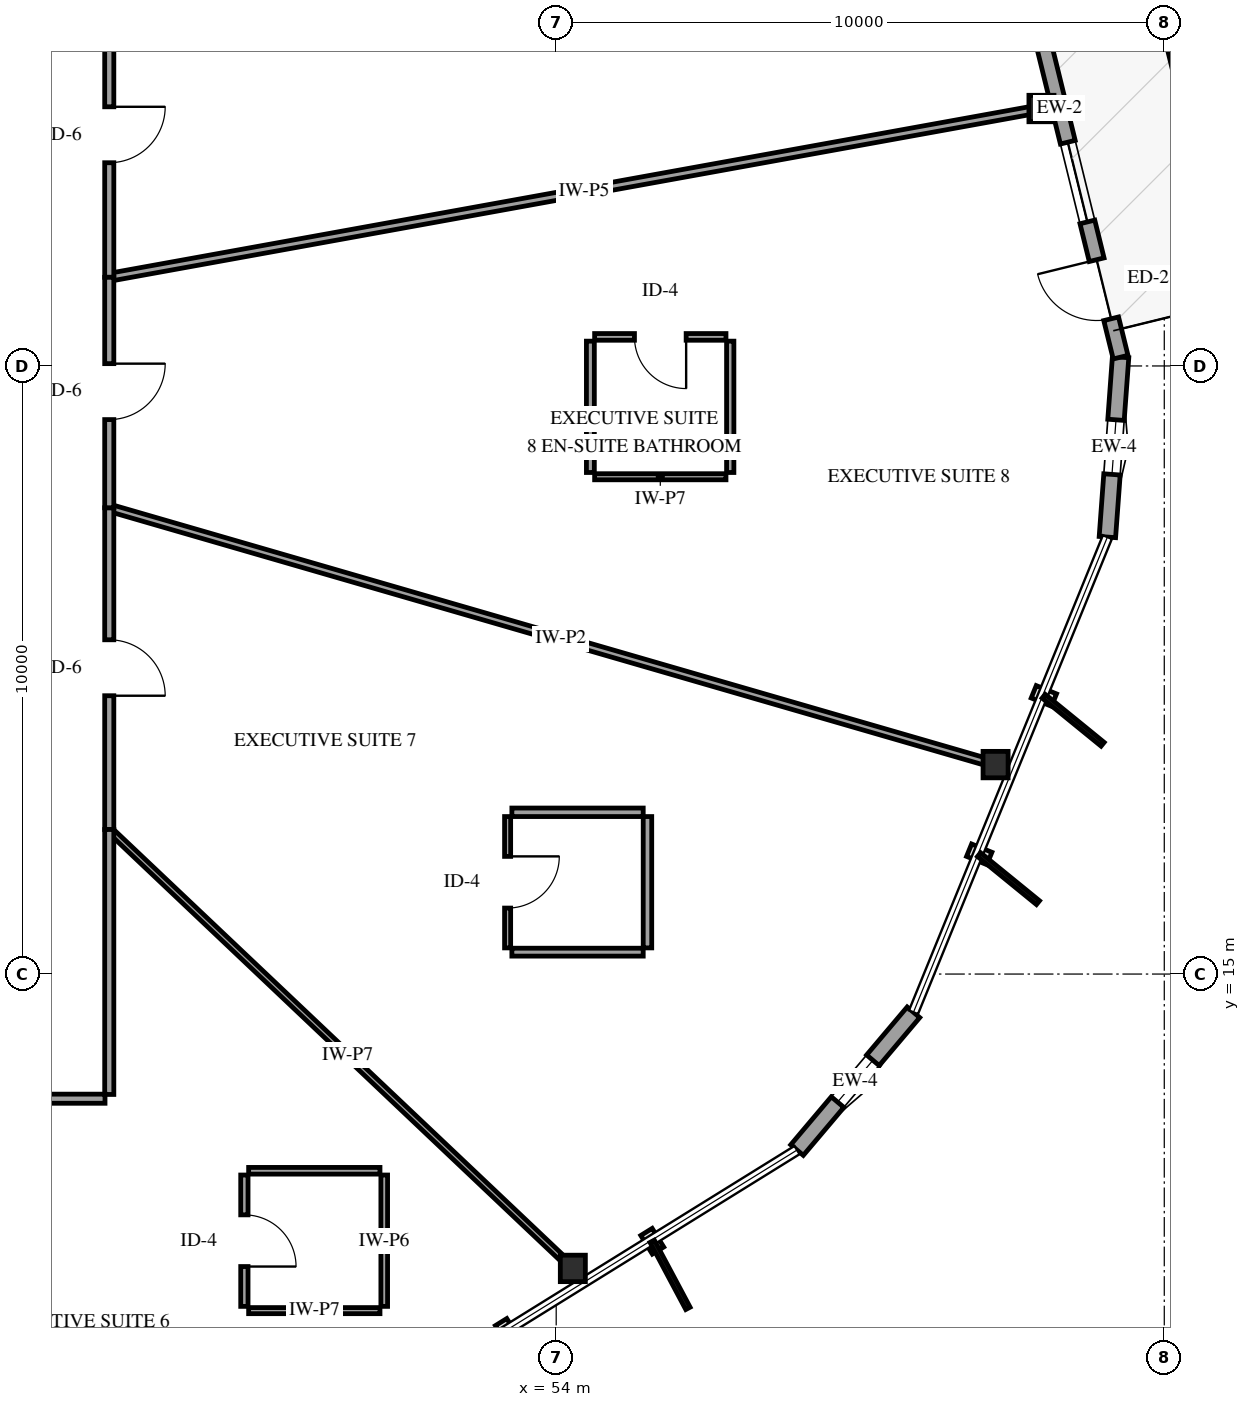
"""IFC4 building model, lengths in metres.
Left out: names, types, materials, properties, quantities, classifications, styles, units other than length and angle.
Written with IfcOpenShell. Run it as: python <this file> out.ifc"""

import sys

from ifc_helpers import new_model, si_unit, direction, frame, frame_2d, origin, origin_2d, place, context, subcontext, project, spatial, rectangle, i_section, extrude, element, fill, save


model = new_model("IFC4")
c1 = context("Model", 3, precision=1e-05, world=origin(), true_north=direction((0.0, 1.0)))
c2 = subcontext(c1, "Body", "Model", "MODEL_VIEW")
j1 = project(units=[si_unit("LENGTHUNIT", "METRE"), si_unit("PLANEANGLEUNIT", "RADIAN")], contexts=[c1])
p1 = place(None, origin())
s1 = spatial("IfcSite", under=j1, at=p1, CompositionType="ELEMENT")
p2 = place(p1, origin())
s2 = spatial("IfcBuilding", under=s1, at=p2, CompositionType="ELEMENT")
p3 = place(p2, frame((0.0, 0.0, 153.4)))
s3 = spatial("IfcBuildingStorey", under=s2, at=p3, CompositionType="ELEMENT", Elevation=153.4)
for number, where, z_axis, x_axis in (
    (1, (61.98, 29.234, 0.0), (0.0, 0.0, 1.0), (1.0, 0.0, 0.0)),
    (2, (54.274, 10.159, 0.0), (0.0, 0.0, 1.0), (1.0, 0.0, 0.0)),
    (3, (61.226, 18.444, 0.0), (0.0, 0.0, 1.0), (1.0, 0.0, 0.0)),
):
    element("IfcColumn", number, at=place(p3, frame(where, z_axis=z_axis, x_axis=x_axis)), inside=s3, PredefinedType="COLUMN", context=c2, shape_type="SweptSolid", body=[
        extrude(i_section(OverallWidth=0.412, OverallDepth=0.435, WebThickness=0.036, FlangeThickness=0.057, FilletRadius=0.038, at=origin_2d()), origin(), (0.0, 0.0, 1.0), 3.6),
    ])
p4 = place(p3, frame((57.96, 12.106, 0.0), z_axis=(0.0, 0.0, 1.0), x_axis=(0.645495712839, 0.763763893299, 0.0)))
e4 = element("IfcWall", 4, at=p4, inside=s3, PredefinedType="SOLIDWALL", context=c2, shape_type="SweptSolid", body=[
    extrude(rectangle(XDim=2.966, YDim=0.27, at=frame_2d((1.483, 0.0))), origin(), (0.0, 0.0, 1.0), 2.679),
])
p5 = place(p4, frame((1.033, 0.0, 0.75)))
e5 = element("IfcOpeningElement", 5, at=p5, cuts=e4, PredefinedType="OPENING", context=c2, shape_type="SweptSolid", body=[
    extrude(rectangle(XDim=0.9, YDim=1.5, at=frame_2d((0.45, 0.75))), frame((0.0, 0.145, 0.0), z_axis=(0.0, -1.0, 0.0), x_axis=(1.0, 0.0, 0.0)), (0.0, 0.0, 1.0), 0.29),
])
p6 = place(p3, frame((63.064, 22.186, 0.0), z_axis=(0.0, 0.0, 1.0), x_axis=(0.073247177567, 0.997313817702, 0.0)))
e6 = element("IfcWall", 6, at=p6, inside=s3, PredefinedType="SOLIDWALL", context=c2, shape_type="SweptSolid", body=[
    extrude(rectangle(XDim=2.967, YDim=0.27, at=frame_2d((1.483, 0.0))), origin(), (0.0, 0.0, 1.0), 2.679),
])
p7 = place(p6, frame((1.033, 0.0, 0.75)))
e7 = element("IfcOpeningElement", 7, at=p7, cuts=e6, PredefinedType="OPENING", context=c2, shape_type="SweptSolid", body=[
    extrude(rectangle(XDim=0.9, YDim=1.5, at=frame_2d((0.45, 0.75))), frame((0.0, 0.145, 0.0), z_axis=(0.0, -1.0, 0.0), x_axis=(1.0, 0.0, 0.0)), (0.0, 0.0, 1.0), 0.29),
])
p8 = place(p3, frame((63.282, 25.145, 0.0), z_axis=(0.0, 0.0, 1.0), x_axis=(-0.238545314463, 0.971131367503, 0.0)))
e8 = element("IfcWall", 8, at=p8, inside=s3, PredefinedType="SOLIDWALL", context=c2, shape_type="SweptSolid", body=[
    extrude(rectangle(XDim=8.44, YDim=0.25, at=frame_2d((4.22, 0.0))), origin(), (0.0, 0.0, 1.0), 2.679),
])
p9 = place(p8, frame((0.65, 0.0, 0.0)))
e9 = element("IfcOpeningElement", 9, at=p9, cuts=e8, PredefinedType="OPENING", context=c2, shape_type="SweptSolid", body=[
    extrude(rectangle(XDim=1.0, YDim=2.15, at=frame_2d((0.5, 1.075))), frame((0.0, 0.135, 0.0), z_axis=(0.0, -1.0, 0.0), x_axis=(1.0, 0.0, 0.0)), (0.0, 0.0, 1.0), 0.27),
])
p10 = place(p8, frame((2.29, 0.0, 0.72)))
e10 = element("IfcOpeningElement", 10, at=p10, cuts=e8, PredefinedType="OPENING", context=c2, shape_type="SweptSolid", body=[
    extrude(rectangle(XDim=1.35, YDim=1.65, at=frame_2d((0.675, 0.825))), frame((0.0, 0.135, 0.0), z_axis=(0.0, -1.0, 0.0), x_axis=(1.0, 0.0, 0.0)), (0.0, 0.0, 1.0), 0.27),
])
p11 = place(p3, frame((62.265, 29.285, 0.0), z_axis=(0.0, 0.0, 1.0), x_axis=(-0.984004770571, -0.17814211039, 0.0)))
e11 = element("IfcWall", 11, at=p11, inside=s3, PredefinedType="PARTITIONING", context=c2, shape_type="SweptSolid", body=[
    extrude(rectangle(XDim=15.869, YDim=0.13, at=frame_2d((7.935, 0.0))), origin(), (0.0, 0.0, 1.0), 2.595),
])
p12 = place(p3, frame((46.65, 22.668, 0.0), z_axis=(0.0, 0.0, 1.0), x_axis=(0.960493218243, -0.27830339148, 0.0)))
e12 = element("IfcWall", 12, at=p12, inside=s3, PredefinedType="PARTITIONING", context=c2, shape_type="SweptSolid", body=[
    extrude(rectangle(XDim=15.465, YDim=0.12, at=frame_2d((7.732, 0.0))), origin(), (0.0, 0.0, 1.0), 3.3),
])
p13 = place(p3, frame((46.65, 17.377, 0.0), z_axis=(0.0, 0.0, 1.0), x_axis=(0.726165374711, -0.687520071395, 0.0)))
e13 = element("IfcWall", 13, at=p13, inside=s3, PredefinedType="PARTITIONING", context=c2, shape_type="SweptSolid", body=[
    extrude(rectangle(XDim=10.797, YDim=0.1, at=frame_2d((5.398, 0.0))), origin(), (0.0, 0.0, 1.0), 2.595),
])
p14 = place(p3, frame((46.65, 22.668, 0.0), z_axis=(0.0, 0.0, 1.0), x_axis=(0.0, -1.0, 0.0)))
e14 = element("IfcWall", 14, at=p14, inside=s3, PredefinedType="PARTITIONING", context=c2, shape_type="SweptSolid", body=[
    extrude(rectangle(XDim=5.291, YDim=0.15, at=frame_2d((2.646, 0.0))), origin(), (0.0, 0.0, 1.0), 3.3),
])
p15 = place(p14, frame((2.171, 0.0, 0.0)))
e15 = element("IfcOpeningElement", 15, at=p15, cuts=e14, PredefinedType="OPENING", context=c2, shape_type="SweptSolid", body=[
    extrude(rectangle(XDim=0.92, YDim=2.12, at=frame_2d((0.46, 1.06))), frame((0.0, 0.085, 0.0), z_axis=(0.0, -1.0, 0.0), x_axis=(1.0, 0.0, 0.0)), (0.0, 0.0, 1.0), 0.17),
])
p16 = place(p3, frame((46.65, 31.115, 0.0), z_axis=(0.0, 0.0, 1.0), x_axis=(0.0, -1.0, 0.0)))
e16 = element("IfcWall", 16, at=p16, inside=s3, PredefinedType="PARTITIONING", context=c2, shape_type="SweptSolid", body=[
    extrude(rectangle(XDim=4.657, YDim=0.15, at=frame_2d((2.329, 0.0))), origin(), (0.0, 0.0, 1.0), 3.3),
])
p17 = place(p16, frame((1.853, 0.0, 0.0)))
e17 = element("IfcOpeningElement", 17, at=p17, cuts=e16, PredefinedType="OPENING", context=c2, shape_type="SweptSolid", body=[
    extrude(rectangle(XDim=0.92, YDim=2.12, at=frame_2d((0.46, 1.06))), frame((0.0, 0.085, 0.0), z_axis=(0.0, -1.0, 0.0), x_axis=(1.0, 0.0, 0.0)), (0.0, 0.0, 1.0), 0.17),
])
p18 = place(p3, frame((46.65, 17.377, 0.0), z_axis=(0.0, 0.0, 1.0), x_axis=(0.0, -1.0, 0.0)))
e18 = element("IfcWall", 18, at=p18, inside=s3, PredefinedType="PARTITIONING", context=c2, shape_type="SweptSolid", body=[
    extrude(rectangle(XDim=4.357, YDim=0.15, at=frame_2d((2.178, 0.0))), origin(), (0.0, 0.0, 1.0), 3.3),
])
p19 = place(p3, frame((46.65, 26.458, 0.0), z_axis=(0.0, 0.0, 1.0), x_axis=(0.0, -1.0, 0.0)))
e19 = element("IfcWall", 19, at=p19, inside=s3, PredefinedType="PARTITIONING", context=c2, shape_type="SweptSolid", body=[
    extrude(rectangle(XDim=3.79, YDim=0.15, at=frame_2d((1.895, 0.0))), origin(), (0.0, 0.0, 1.0), 3.3),
])
p20 = place(p19, frame((1.42, 0.0, 0.0)))
e20 = element("IfcOpeningElement", 20, at=p20, cuts=e19, PredefinedType="OPENING", context=c2, shape_type="SweptSolid", body=[
    extrude(rectangle(XDim=0.92, YDim=2.12, at=frame_2d((0.46, 1.06))), frame((0.0, 0.085, 0.0), z_axis=(0.0, -1.0, 0.0), x_axis=(1.0, 0.0, 0.0)), (0.0, 0.0, 1.0), 0.17),
])
p21 = place(p3, frame((46.58, 12.95, 0.0), z_axis=(0.0, 0.0, 1.0), x_axis=(-1.0, 0.0, 0.0)))
e21 = element("IfcWall", 21, at=p21, inside=s3, PredefinedType="PARTITIONING", context=c2, shape_type="SweptSolid", body=[
    extrude(rectangle(XDim=3.31, YDim=0.15, at=frame_2d((1.655, 0.0))), origin(), (0.0, 0.0, 1.0), 3.3),
])
p22 = place(p3, frame((56.792, 25.478, 0.0), z_axis=(0.0, 0.0, 1.0), x_axis=(-1.0, 0.0, 0.0)))
e22 = element("IfcWall", 22, at=p22, inside=s3, PredefinedType="PARTITIONING", context=c2, shape_type="SweptSolid", body=[
    extrude(rectangle(XDim=2.16, YDim=0.11, at=frame_2d((1.08, 0.0))), origin(), (0.0, 0.0, 1.0), 3.3),
])
p23 = place(p22, frame((0.655, 0.0, 0.0)))
e23 = element("IfcOpeningElement", 23, at=p23, cuts=e22, PredefinedType="OPENING", context=c2, shape_type="SweptSolid", body=[
    extrude(rectangle(XDim=0.85, YDim=2.1, at=frame_2d((0.425, 1.05))), frame((0.0, 0.065, 0.0), z_axis=(0.0, -1.0, 0.0), x_axis=(1.0, 0.0, 0.0)), (0.0, 0.0, 1.0), 0.13),
])
p24 = place(p3, frame((54.632, 23.178, 0.0), z_axis=(0.0, 0.0, 1.0), x_axis=(1.0, 0.0, 0.0)))
e24 = element("IfcWall", 24, at=p24, inside=s3, PredefinedType="PARTITIONING", context=c2, shape_type="SweptSolid", body=[
    extrude(rectangle(XDim=2.16, YDim=0.1, at=frame_2d((1.08, 0.0))), origin(), (0.0, 0.0, 1.0), 3.3),
])
p25 = place(p3, frame((48.872, 11.695, 0.0), z_axis=(0.0, 0.0, 1.0), x_axis=(0.0, -1.0, 0.0)))
e25 = element("IfcWall", 25, at=p25, inside=s3, PredefinedType="PARTITIONING", context=c2, shape_type="SweptSolid", body=[
    extrude(rectangle(XDim=2.16, YDim=0.12, at=frame_2d((1.08, 0.0))), origin(), (0.0, 0.0, 1.0), 3.3),
])
p26 = place(p25, frame((0.655, 0.0, 0.0)))
e26 = element("IfcOpeningElement", 26, at=p26, cuts=e25, PredefinedType="OPENING", context=c2, shape_type="SweptSolid", body=[
    extrude(rectangle(XDim=0.85, YDim=2.1, at=frame_2d((0.425, 1.05))), frame((0.0, 0.07, 0.0), z_axis=(0.0, -1.0, 0.0), x_axis=(1.0, 0.0, 0.0)), (0.0, 0.0, 1.0), 0.14),
])
p27 = place(p3, frame((51.172, 9.535, 0.0), z_axis=(0.0, 0.0, 1.0), x_axis=(0.0, 1.0, 0.0)))
e27 = element("IfcWall", 27, at=p27, inside=s3, PredefinedType="PARTITIONING", context=c2, shape_type="SweptSolid", body=[
    extrude(rectangle(XDim=2.16, YDim=0.11, at=frame_2d((1.08, 0.0))), origin(), (0.0, 0.0, 1.0), 3.3),
])
p28 = place(p3, frame((53.201, 17.59, 0.0), z_axis=(0.0, 0.0, 1.0), x_axis=(0.0, -1.0, 0.0)))
e28 = element("IfcWall", 28, at=p28, inside=s3, PredefinedType="PARTITIONING", context=c2, shape_type="SweptSolid", body=[
    extrude(rectangle(XDim=2.16, YDim=0.1, at=frame_2d((1.08, 0.0))), origin(), (0.0, 0.0, 1.0), 3.3),
])
p29 = place(p28, frame((0.655, 0.0, 0.0)))
e29 = element("IfcOpeningElement", 29, at=p29, cuts=e28, PredefinedType="OPENING", context=c2, shape_type="SweptSolid", body=[
    extrude(rectangle(XDim=0.85, YDim=2.1, at=frame_2d((0.425, 1.05))), frame((0.0, 0.06, 0.0), z_axis=(0.0, -1.0, 0.0), x_axis=(1.0, 0.0, 0.0)), (0.0, 0.0, 1.0), 0.12),
])
p30 = place(p3, frame((55.501, 15.43, 0.0), z_axis=(0.0, 0.0, 1.0), x_axis=(0.0, 1.0, 0.0)))
e30 = element("IfcWall", 30, at=p30, inside=s3, PredefinedType="PARTITIONING", context=c2, shape_type="SweptSolid", body=[
    extrude(rectangle(XDim=2.16, YDim=0.14, at=frame_2d((1.08, 0.0))), origin(), (0.0, 0.0, 1.0), 3.3),
])
p31 = place(p3, frame((54.562, 25.408, 0.0), z_axis=(0.0, 0.0, 1.0), x_axis=(0.0, -1.0, 0.0)))
e31 = element("IfcWall", 31, at=p31, inside=s3, PredefinedType="PARTITIONING", context=c2, shape_type="SweptSolid", body=[
    extrude(rectangle(XDim=2.16, YDim=0.13, at=frame_2d((1.08, 0.0))), origin(), (0.0, 0.0, 1.0), 3.3),
])
p32 = place(p3, frame((56.862, 23.248, 0.0), z_axis=(0.0, 0.0, 1.0), x_axis=(0.0, 1.0, 0.0)))
e32 = element("IfcWall", 32, at=p32, inside=s3, PredefinedType="PARTITIONING", context=c2, shape_type="SweptSolid", body=[
    extrude(rectangle(XDim=2.16, YDim=0.12, at=frame_2d((1.08, 0.0))), origin(), (0.0, 0.0, 1.0), 3.3),
])
p33 = place(p3, frame((51.102, 11.765, 0.0), z_axis=(0.0, 0.0, 1.0), x_axis=(-1.0, 0.0, 0.0)))
e33 = element("IfcWall", 33, at=p33, inside=s3, PredefinedType="PARTITIONING", context=c2, shape_type="SweptSolid", body=[
    extrude(rectangle(XDim=2.16, YDim=0.11, at=frame_2d((1.08, 0.0))), origin(), (0.0, 0.0, 1.0), 3.3),
])
p34 = place(p3, frame((48.942, 9.465, 0.0), z_axis=(0.0, 0.0, 1.0), x_axis=(1.0, 0.0, 0.0)))
e34 = element("IfcWall", 34, at=p34, inside=s3, PredefinedType="PARTITIONING", context=c2, shape_type="SweptSolid", body=[
    extrude(rectangle(XDim=2.16, YDim=0.1, at=frame_2d((1.08, 0.0))), origin(), (0.0, 0.0, 1.0), 2.511),
])
p35 = place(p3, frame((55.431, 17.66, 0.0), z_axis=(0.0, 0.0, 1.0), x_axis=(-1.0, 0.0, 0.0)))
e35 = element("IfcWall", 35, at=p35, inside=s3, PredefinedType="PARTITIONING", context=c2, shape_type="SweptSolid", body=[
    extrude(rectangle(XDim=2.16, YDim=0.14, at=frame_2d((1.08, 0.0))), origin(), (0.0, 0.0, 1.0), 3.3),
])
p36 = place(p3, frame((53.271, 15.36, 0.0), z_axis=(0.0, 0.0, 1.0), x_axis=(1.0, 0.0, 0.0)))
e36 = element("IfcWall", 36, at=p36, inside=s3, PredefinedType="PARTITIONING", context=c2, shape_type="SweptSolid", body=[
    extrude(rectangle(XDim=2.16, YDim=0.13, at=frame_2d((1.08, 0.0))), origin(), (0.0, 0.0, 1.0), 3.3),
])
p37 = place(p5, origin())
e37 = element("IfcWindow", 37, at=p37, inside=s3, PartitioningType="SINGLE_PANEL", PredefinedType="WINDOW", context=c2, shape_type="SweptSolid", body=[
    extrude(rectangle(XDim=0.9, YDim=1.5, at=frame_2d((0.45, 0.75))), frame((0.0, 0.03, 0.0), z_axis=(0.0, -1.0, 0.0), x_axis=(1.0, 0.0, 0.0)), (0.0, 0.0, 1.0), 0.06),
])
fill(e5, e37)
p38 = place(p7, origin())
e38 = element("IfcWindow", 38, at=p38, inside=s3, PartitioningType="SINGLE_PANEL", PredefinedType="WINDOW", context=c2, shape_type="SweptSolid", body=[
    extrude(rectangle(XDim=0.9, YDim=1.5, at=frame_2d((0.45, 0.75))), frame((0.0, 0.03, 0.0), z_axis=(0.0, -1.0, 0.0), x_axis=(1.0, 0.0, 0.0)), (0.0, 0.0, 1.0), 0.06),
])
fill(e7, e38)
p39 = place(p9, origin())
e39 = element("IfcDoor", 39, at=p39, inside=s3, OperationType="SINGLE_SWING_RIGHT", PredefinedType="DOOR", context=c2, shape_type="SweptSolid", body=[
    extrude(rectangle(XDim=1.0, YDim=2.15, at=frame_2d((0.5, 1.075))), frame((0.0, 0.025, 0.0), z_axis=(0.0, -1.0, 0.0), x_axis=(1.0, 0.0, 0.0)), (0.0, 0.0, 1.0), 0.05),
])
fill(e9, e39)
p40 = place(p10, origin())
e40 = element("IfcWindow", 40, at=p40, inside=s3, PartitioningType="SINGLE_PANEL", PredefinedType="WINDOW", context=c2, shape_type="SweptSolid", body=[
    extrude(rectangle(XDim=1.35, YDim=1.65, at=frame_2d((0.675, 0.825))), frame((0.0, 0.03, 0.0), z_axis=(0.0, -1.0, 0.0), x_axis=(1.0, 0.0, 0.0)), (0.0, 0.0, 1.0), 0.06),
])
fill(e10, e40)
p41 = place(p15, origin())
e41 = element("IfcDoor", 41, at=p41, inside=s3, OperationType="SINGLE_SWING_RIGHT", PredefinedType="DOOR", context=c2, shape_type="SweptSolid", body=[
    extrude(rectangle(XDim=0.92, YDim=2.12, at=frame_2d((0.46, 1.06))), frame((0.0, 0.025, 0.0), z_axis=(0.0, -1.0, 0.0), x_axis=(1.0, 0.0, 0.0)), (0.0, 0.0, 1.0), 0.05),
])
fill(e15, e41)
p42 = place(p17, origin())
e42 = element("IfcDoor", 42, at=p42, inside=s3, OperationType="SINGLE_SWING_LEFT", PredefinedType="DOOR", context=c2, shape_type="SweptSolid", body=[
    extrude(rectangle(XDim=0.92, YDim=2.12, at=frame_2d((0.46, 1.06))), frame((0.0, 0.025, 0.0), z_axis=(0.0, -1.0, 0.0), x_axis=(1.0, 0.0, 0.0)), (0.0, 0.0, 1.0), 0.05),
])
fill(e17, e42)
p43 = place(p20, origin())
e43 = element("IfcDoor", 43, at=p43, inside=s3, OperationType="SINGLE_SWING_LEFT", PredefinedType="DOOR", context=c2, shape_type="SweptSolid", body=[
    extrude(rectangle(XDim=0.92, YDim=2.12, at=frame_2d((0.46, 1.06))), frame((0.0, 0.025, 0.0), z_axis=(0.0, -1.0, 0.0), x_axis=(1.0, 0.0, 0.0)), (0.0, 0.0, 1.0), 0.05),
])
fill(e20, e43)
p44 = place(p23, origin())
e44 = element("IfcDoor", 44, at=p44, inside=s3, OperationType="SINGLE_SWING_LEFT", PredefinedType="DOOR", context=c2, shape_type="SweptSolid", body=[
    extrude(rectangle(XDim=0.85, YDim=2.1, at=frame_2d((0.425, 1.05))), frame((0.0, 0.025, 0.0), z_axis=(0.0, -1.0, 0.0), x_axis=(1.0, 0.0, 0.0)), (0.0, 0.0, 1.0), 0.05),
])
fill(e23, e44)
p45 = place(p26, origin())
e45 = element("IfcDoor", 45, at=p45, inside=s3, OperationType="SINGLE_SWING_RIGHT", PredefinedType="DOOR", context=c2, shape_type="SweptSolid", body=[
    extrude(rectangle(XDim=0.85, YDim=2.1, at=frame_2d((0.425, 1.05))), frame((0.0, 0.025, 0.0), z_axis=(0.0, -1.0, 0.0), x_axis=(1.0, 0.0, 0.0)), (0.0, 0.0, 1.0), 0.05),
])
fill(e26, e45)
p46 = place(p29, origin())
e46 = element("IfcDoor", 46, at=p46, inside=s3, OperationType="SINGLE_SWING_LEFT", PredefinedType="DOOR", context=c2, shape_type="SweptSolid", body=[
    extrude(rectangle(XDim=0.85, YDim=2.1, at=frame_2d((0.425, 1.05))), frame((0.0, 0.025, 0.0), z_axis=(0.0, -1.0, 0.0), x_axis=(1.0, 0.0, 0.0)), (0.0, 0.0, 1.0), 0.05),
])
fill(e29, e46)
save(model, sys.argv[1])
